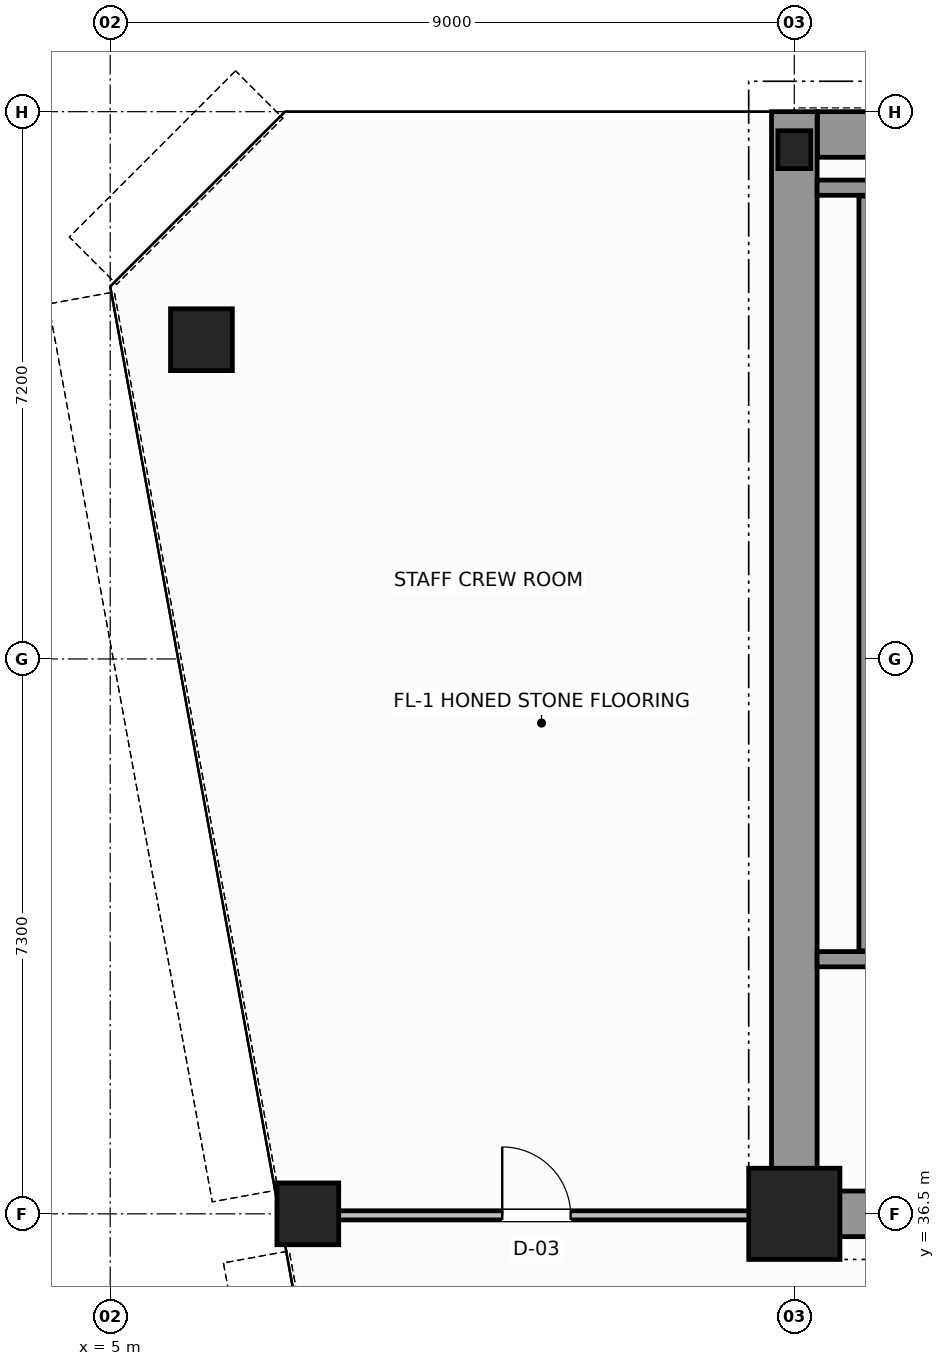
"""IFC4 building model, lengths in metres.
Left out: names, types, materials, properties, quantities, classifications, styles, units other than length and angle.
Written with IfcOpenShell. Run it as: python <this file> out.ifc"""

import sys

from ifc_helpers import new_model, si_unit, direction, frame, frame_2d, origin, origin_2d, place, context, subcontext, project, spatial, rectangle, hollow_circle, i_section, extrude, source, transform, mapped, element, fill, save


model = new_model("IFC4")
c1 = context("Model", 3, precision=1e-05, world=origin(), true_north=direction((0.0, 1.0)))
c2 = subcontext(c1, "Body", "Model", "MODEL_VIEW")
j1 = project(units=[si_unit("LENGTHUNIT", "METRE"), si_unit("PLANEANGLEUNIT", "RADIAN")], contexts=[c1])
p1 = place(None, origin())
s1 = spatial("IfcSite", under=j1, at=p1, CompositionType="ELEMENT")
p2 = place(p1, origin())
s2 = spatial("IfcBuilding", under=s1, at=p2, CompositionType="ELEMENT")
p3 = place(p2, frame((0.0, 0.0, 172.8)))
s3 = spatial("IfcBuildingStorey", under=s2, at=p3, CompositionType="ELEMENT", Elevation=172.8)
m1 = source(origin(), c2, "Body", "SweptSolid", [
    extrude(rectangle(XDim=1.2, YDim=1.2, at=origin_2d()), origin(), (0.0, 0.0, 1.0), 3.8),
])
p4 = place(p3, frame((14.0, 36.5, 0.0), z_axis=(0.0, 0.0, 1.0), x_axis=(1.0, 0.0, 0.0)))
e1 = element("IfcColumn", 1, at=p4, inside=s3, PredefinedType="COLUMN", context=c2, shape_type="MappedRepresentation", body=[
    mapped(m1, transform((0.0, 0.0, 0.0), scale=1.0)),
])
m2 = source(origin(), c2, "Body", "SweptSolid", [
    extrude(i_section(OverallWidth=0.432, OverallDepth=0.498, WebThickness=0.055, FlangeThickness=0.068, FilletRadius=0.015, at=origin_2d()), origin(), (0.0, 0.0, 1.0), 3.8),
])
p5 = place(p3, frame((14.0, 50.5, 0.0), z_axis=(0.0, 0.0, 1.0), x_axis=(1.0, 0.0, 0.0)))
e2 = element("IfcColumn", 2, at=p5, inside=s3, PredefinedType="COLUMN", context=c2, shape_type="MappedRepresentation", body=[
    mapped(m2, transform((0.0, 0.0, 0.0), scale=1.0)),
])
m3 = source(origin(), c2, "Body", "SweptSolid", [
    extrude(hollow_circle(Radius=0.406, WallThickness=0.04, at=origin_2d()), origin(), (0.0, 0.0, 1.0), 3.8),
])
for number, where, z_axis, x_axis in (
    (3, (6.2, 48.0, 0.0), (0.0, 0.0, 1.0), (1.0, 0.0, 0.0)),
    (4, (7.6, 36.5, 0.0), (0.0, 0.0, 1.0), (1.0, 0.0, 0.0)),
):
    element("IfcColumn", number, at=place(p3, frame(where, z_axis=z_axis, x_axis=x_axis)), inside=s3, PredefinedType="COLUMN", context=c2, shape_type="MappedRepresentation", body=[
        mapped(m3, transform((0.0, 0.0, 0.0), scale=1.0)),
    ])
p6 = place(p3, frame((14.304, 50.7, 0.0), z_axis=(0.0, 0.0, 1.0), x_axis=(1.0, 0.0, 0.0)))
e5 = element("IfcWall", 5, at=p6, inside=s3, PredefinedType="SHEAR", context=c2, shape_type="SweptSolid", body=[
    extrude(rectangle(XDim=19.694, YDim=0.6, at=frame_2d((9.847, 0.0))), origin(), (0.0, 0.0, 1.0), 3.8),
])
p7 = place(p3, frame((14.0, 36.5, 0.0), z_axis=(0.0, 0.0, 1.0), x_axis=(0.0, 1.0, 0.0)))
e6 = element("IfcWall", 6, at=p7, inside=s3, PredefinedType="SHEAR", context=c2, shape_type="SweptSolid", body=[
    extrude(rectangle(XDim=14.5, YDim=0.6, at=frame_2d((7.25, 0.0))), origin(), (0.0, 0.0, 1.0), 3.8),
])
p8 = place(p3, frame((14.32, 36.5, 0.0), z_axis=(0.0, 0.0, 1.0), x_axis=(1.0, 0.0, 0.0)))
e7 = element("IfcWall", 7, at=p8, inside=s3, PredefinedType="SHEAR", context=c2, shape_type="SweptSolid", body=[
    extrude(rectangle(XDim=3.88, YDim=0.6, at=frame_2d((1.94, 0.0))), origin(), (0.0, 0.0, 1.0), 2.58),
])
p9 = place(p3, frame((14.3, 39.85, 0.0), z_axis=(0.0, 0.0, 1.0), x_axis=(1.0, 0.0, 0.0)))
e8 = element("IfcWall", 8, at=p9, inside=s3, PredefinedType="SOLIDWALL", context=c2, shape_type="SweptSolid", body=[
    extrude(rectangle(XDim=4.3, YDim=0.2, at=frame_2d((2.15, 0.0))), origin(), (0.0, 0.0, 1.0), 3.8),
])
p10 = place(p9, frame((1.875, 0.0, 0.0)))
e9 = element("IfcOpeningElement", 9, at=p10, cuts=e8, PredefinedType="OPENING", context=c2, shape_type="SweptSolid", body=[
    extrude(rectangle(XDim=1.1, YDim=2.15, at=frame_2d((0.55, 1.075))), frame((0.0, 0.11, 0.0), z_axis=(0.0, -1.0, 0.0), x_axis=(1.0, 0.0, 0.0)), (0.0, 0.0, 1.0), 0.22),
])
p11 = place(p3, frame((14.3, 50.0, 0.0), z_axis=(0.0, 0.0, 1.0), x_axis=(1.0, 0.0, 0.0)))
e10 = element("IfcWall", 10, at=p11, inside=s3, PredefinedType="SOLIDWALL", context=c2, shape_type="SweptSolid", body=[
    extrude(rectangle(XDim=4.3, YDim=0.2, at=frame_2d((2.15, 0.0))), origin(), (0.0, 0.0, 1.0), 3.8),
])
p12 = place(p3, frame((14.95, 39.96, 0.0), z_axis=(0.0, 0.0, 1.0), x_axis=(0.0, 1.0, 0.0)))
e11 = element("IfcWall", 11, at=p12, inside=s3, PredefinedType="SOLIDWALL", context=c2, shape_type="SweptSolid", body=[
    extrude(rectangle(XDim=9.93, YDim=0.2, at=frame_2d((4.965, 0.0))), origin(), (0.0, 0.0, 1.0), 3.8),
])
p13 = place(p3, frame((7.274, 36.48, 0.0), z_axis=(0.0, 0.0, 1.0), x_axis=(1.0, 0.0, 0.0)))
e12 = element("IfcWall", 12, at=p13, inside=s3, PredefinedType="PARTITIONING", context=c2, shape_type="SweptSolid", body=[
    extrude(rectangle(XDim=6.666, YDim=0.12, at=frame_2d((3.333, 0.0))), origin(), (0.0, 0.0, 1.0), 2.97),
])
p14 = place(p13, frame((2.883, 0.0, 0.0)))
e13 = element("IfcOpeningElement", 13, at=p14, cuts=e12, PredefinedType="OPENING", context=c2, shape_type="SweptSolid", body=[
    extrude(rectangle(XDim=0.9, YDim=2.15, at=frame_2d((0.45, 1.075))), frame((0.0, 0.07, 0.0), z_axis=(0.0, -1.0, 0.0), x_axis=(1.0, 0.0, 0.0)), (0.0, 0.0, 1.0), 0.14),
])
m4 = source(origin(), c2, "Body", "SweptSolid", [
    extrude(rectangle(XDim=0.9, YDim=2.15, at=frame_2d((0.45, 1.075))), frame((0.0, 0.025, 0.0), z_axis=(0.0, -1.0, 0.0), x_axis=(1.0, 0.0, 0.0)), (0.0, 0.0, 1.0), 0.05),
])
p15 = place(p14, origin())
e14 = element("IfcDoor", 14, at=p15, inside=s3, OperationType="SINGLE_SWING_LEFT", PredefinedType="DOOR", context=c2, shape_type="MappedRepresentation", body=[
    mapped(m4, transform((0.0, 0.0, 0.0), scale=1.0)),
])
fill(e13, e14)
save(model, sys.argv[1])
